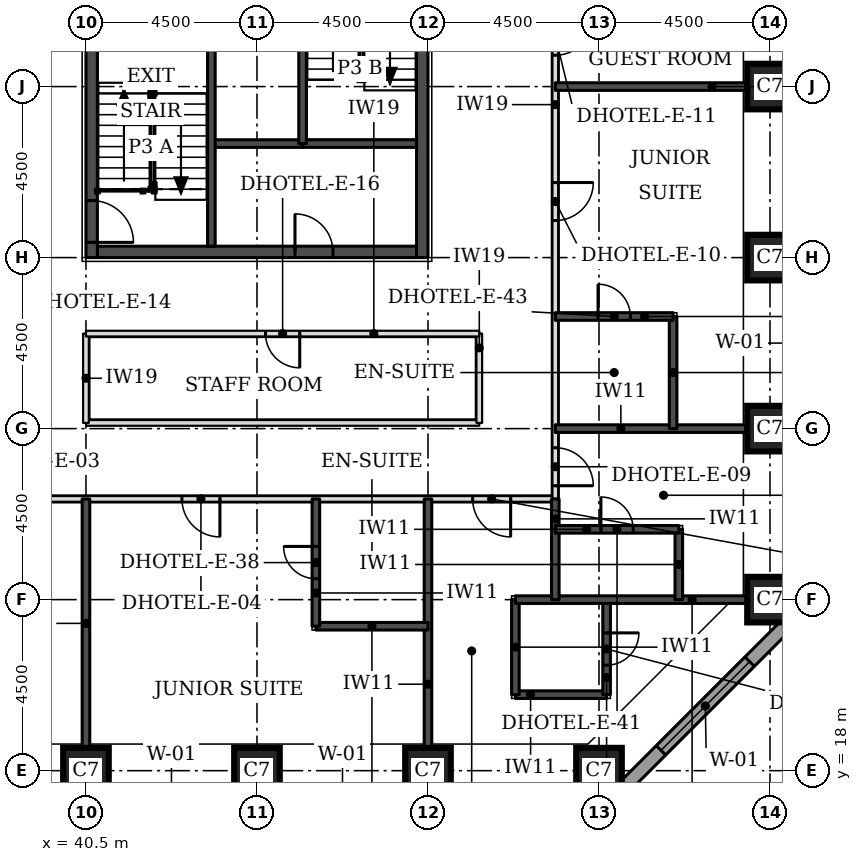
"""IFC4 building model, lengths in metres.
Left out: names, types, materials, properties, quantities, classifications, styles, units other than length and angle.
Written with IfcOpenShell. Run it as: python <this file> out.ifc"""

import sys

from ifc_helpers import new_model, si_unit, direction, frame, frame_2d, origin, origin_2d, place, context, subcontext, project, spatial, rectangle, extrude, element, fill, save


model = new_model("IFC4")
c1 = context("Model", 3, precision=1e-05, world=origin(), true_north=direction((0.0, 1.0)))
c2 = subcontext(c1, "Body", "Model", "MODEL_VIEW")
j1 = project(units=[si_unit("LENGTHUNIT", "METRE"), si_unit("PLANEANGLEUNIT", "RADIAN")], contexts=[c1])
p1 = place(None, origin())
s1 = spatial("IfcSite", under=j1, at=p1, CompositionType="ELEMENT")
p2 = place(p1, origin())
s2 = spatial("IfcBuilding", under=s1, at=p2, CompositionType="ELEMENT")
p3 = place(p2, frame((0.0, 0.0, 62.7)))
s3 = spatial("IfcBuildingStorey", under=s2, at=p3, CompositionType="ELEMENT", Elevation=62.7)
for number, where, z_axis, x_axis in (
    (1, (40.5, 18.0, 0.0), (0.0, 0.0, 1.0), (1.0, 0.0, 0.0)),
    (2, (45.0, 18.0, 0.0), (0.0, 0.0, 1.0), (1.0, 0.0, 0.0)),
    (3, (49.5, 18.0, 0.0), (0.0, 0.0, 1.0), (1.0, 0.0, 0.0)),
    (4, (54.0, 18.0, 0.0), (0.0, 0.0, 1.0), (1.0, 0.0, 0.0)),
    (5, (58.5, 22.5, 0.0), (0.0, 0.0, 1.0), (1.0, 0.0, 0.0)),
    (6, (58.5, 27.0, 0.0), (0.0, 0.0, 1.0), (1.0, 0.0, 0.0)),
    (7, (58.5, 31.5, 0.0), (0.0, 0.0, 1.0), (1.0, 0.0, 0.0)),
    (8, (58.5, 36.0, 0.0), (0.0, 0.0, 1.0), (1.0, 0.0, 0.0)),
):
    element("IfcColumn", number, at=place(p3, frame(where, z_axis=z_axis, x_axis=x_axis)), inside=s3, PredefinedType="COLUMN", context=c2, shape_type="SweptSolid", body=[
        extrude(rectangle(XDim=1.2, YDim=1.2, at=origin_2d()), origin(), (0.0, 0.0, 1.0), 3.3),
    ])
p4 = place(p3, frame((40.8, 31.65, 0.0), z_axis=(0.0, 0.0, 1.0), x_axis=(1.0, 0.0, 0.0)))
e9 = element("IfcWall", 9, at=p4, inside=s3, PredefinedType="SHEAR", context=c2, shape_type="SweptSolid", body=[
    extrude(rectangle(XDim=8.4, YDim=0.3, at=frame_2d((4.2, 0.0))), origin(), (0.0, 0.0, 1.0), 3.3),
])
p5 = place(p4, frame((5.2, 0.0, 0.0)))
e10 = element("IfcOpeningElement", 10, at=p5, cuts=e9, PredefinedType="OPENING", context=c2, shape_type="SweptSolid", body=[
    extrude(rectangle(XDim=1.0, YDim=2.1, at=frame_2d((0.5, 1.05))), frame((0.0, 0.16, 0.0), z_axis=(0.0, -1.0, 0.0), x_axis=(1.0, 0.0, 0.0)), (0.0, 0.0, 1.0), 0.32),
])
p6 = place(p3, frame((40.65, 31.5, 0.0), z_axis=(0.0, 0.0, 1.0), x_axis=(0.0, 1.0, 0.0)))
e11 = element("IfcWall", 11, at=p6, inside=s3, PredefinedType="SHEAR", context=c2, shape_type="SweptSolid", body=[
    extrude(rectangle(XDim=9.0, YDim=0.3, at=frame_2d((4.5, 0.0))), origin(), (0.0, 0.0, 1.0), 3.3),
])
p7 = place(p6, frame((0.4, 0.0, 0.0)))
e12 = element("IfcOpeningElement", 12, at=p7, cuts=e11, PredefinedType="OPENING", context=c2, shape_type="SweptSolid", body=[
    extrude(rectangle(XDim=1.1, YDim=2.1, at=frame_2d((0.55, 1.05))), frame((0.0, 0.16, 0.0), z_axis=(0.0, -1.0, 0.0), x_axis=(1.0, 0.0, 0.0)), (0.0, 0.0, 1.0), 0.32),
])
p8 = place(p3, frame((49.35, 31.5, 0.0), z_axis=(0.0, 0.0, 1.0), x_axis=(0.0, 1.0, 0.0)))
e13 = element("IfcWall", 13, at=p8, inside=s3, PredefinedType="SHEAR", context=c2, shape_type="SweptSolid", body=[
    extrude(rectangle(XDim=9.0, YDim=0.3, at=frame_2d((4.5, 0.0))), origin(), (0.0, 0.0, 1.0), 3.3),
])
p9 = place(p3, frame((54.27, 17.174, 0.0), z_axis=(0.0, 0.0, 1.0), x_axis=(0.707106781187, 0.707106781187, 0.0)))
e14 = element("IfcWall", 14, at=p9, inside=s3, PredefinedType="STANDARD", context=c2, shape_type="SweptSolid", body=[
    extrude(rectangle(XDim=7.151, YDim=0.35, at=frame_2d((3.576, 0.0))), origin(), (0.0, 0.0, 1.0), 3.055),
])
p10 = place(p9, frame((1.926, 0.0, 0.8)))
e15 = element("IfcOpeningElement", 15, at=p10, cuts=e14, PredefinedType="OPENING", context=c2, shape_type="SweptSolid", body=[
    extrude(rectangle(XDim=3.3, YDim=1.5, at=frame_2d((1.65, 0.75))), frame((0.0, 0.185, 0.0), z_axis=(0.0, -1.0, 0.0), x_axis=(1.0, 0.0, 0.0)), (0.0, 0.0, 1.0), 0.37),
])
p11 = place(p3, frame((20.65, 25.15, 0.0), z_axis=(0.0, 0.0, 1.0), x_axis=(1.0, 0.0, 0.0)))
e16 = element("IfcWall", 16, at=p11, inside=s3, PredefinedType="PARTITIONING", context=c2, shape_type="SweptSolid", body=[
    extrude(rectangle(XDim=32.2, YDim=0.15, at=frame_2d((16.1, 0.0))), origin(), (0.0, 0.0, 1.0), 3.08),
])
p12 = place(p11, frame((4.375, 0.0, 0.0)))
e17 = element("IfcOpeningElement", 17, at=p12, cuts=e16, PredefinedType="OPENING", context=c2, shape_type="SweptSolid", body=[
    extrude(rectangle(XDim=1.0, YDim=2.1, at=frame_2d((0.5, 1.05))), frame((0.0, 0.085, 0.0), z_axis=(0.0, -1.0, 0.0), x_axis=(1.0, 0.0, 0.0)), (0.0, 0.0, 1.0), 0.17),
])
p13 = place(p11, frame((16.075, 0.0, 0.0)))
e18 = element("IfcOpeningElement", 18, at=p13, cuts=e16, PredefinedType="OPENING", context=c2, shape_type="SweptSolid", body=[
    extrude(rectangle(XDim=1.0, YDim=2.1, at=frame_2d((0.5, 1.05))), frame((0.0, 0.085, 0.0), z_axis=(0.0, -1.0, 0.0), x_axis=(1.0, 0.0, 0.0)), (0.0, 0.0, 1.0), 0.17),
])
p14 = place(p11, frame((22.375, 0.0, 0.0)))
e19 = element("IfcOpeningElement", 19, at=p14, cuts=e16, PredefinedType="OPENING", context=c2, shape_type="SweptSolid", body=[
    extrude(rectangle(XDim=1.0, YDim=2.1, at=frame_2d((0.5, 1.05))), frame((0.0, 0.085, 0.0), z_axis=(0.0, -1.0, 0.0), x_axis=(1.0, 0.0, 0.0)), (0.0, 0.0, 1.0), 0.17),
])
p15 = place(p11, frame((0.425, 0.0, 0.0)))
e20 = element("IfcOpeningElement", 20, at=p15, cuts=e16, PredefinedType="OPENING", context=c2, shape_type="SweptSolid", body=[
    extrude(rectangle(XDim=1.0, YDim=2.1, at=frame_2d((0.5, 1.05))), frame((0.0, 0.085, 0.0), z_axis=(0.0, -1.0, 0.0), x_axis=(1.0, 0.0, 0.0)), (0.0, 0.0, 1.0), 0.17),
])
p16 = place(p11, frame((30.025, 0.0, 0.0)))
e21 = element("IfcOpeningElement", 21, at=p16, cuts=e16, PredefinedType="OPENING", context=c2, shape_type="SweptSolid", body=[
    extrude(rectangle(XDim=1.0, YDim=2.1, at=frame_2d((0.5, 1.05))), frame((0.0, 0.085, 0.0), z_axis=(0.0, -1.0, 0.0), x_axis=(1.0, 0.0, 0.0)), (0.0, 0.0, 1.0), 0.17),
])
p17 = place(p3, frame((52.85, 25.15, 0.0), z_axis=(0.0, 0.0, 1.0), x_axis=(0.0, 1.0, 0.0)))
e22 = element("IfcWall", 22, at=p17, inside=s3, PredefinedType="PARTITIONING", context=c2, shape_type="SweptSolid", body=[
    extrude(rectangle(XDim=22.35, YDim=0.15, at=frame_2d((11.175, 0.0))), origin(), (0.0, 0.0, 1.0), 3.08),
])
p18 = place(p17, frame((0.347, 0.0, 0.0)))
e23 = element("IfcOpeningElement", 23, at=p18, cuts=e22, PredefinedType="OPENING", context=c2, shape_type="SweptSolid", body=[
    extrude(rectangle(XDim=1.0, YDim=2.1, at=frame_2d((0.5, 1.05))), frame((0.0, 0.085, 0.0), z_axis=(0.0, -1.0, 0.0), x_axis=(1.0, 0.0, 0.0)), (0.0, 0.0, 1.0), 0.17),
])
p19 = place(p17, frame((7.325, 0.0, 0.0)))
e24 = element("IfcOpeningElement", 24, at=p19, cuts=e22, PredefinedType="OPENING", context=c2, shape_type="SweptSolid", body=[
    extrude(rectangle(XDim=1.0, YDim=2.1, at=frame_2d((0.5, 1.05))), frame((0.0, 0.085, 0.0), z_axis=(0.0, -1.0, 0.0), x_axis=(1.0, 0.0, 0.0)), (0.0, 0.0, 1.0), 0.17),
])
p20 = place(p17, frame((11.675, 0.0, 0.0)))
e25 = element("IfcOpeningElement", 25, at=p20, cuts=e22, PredefinedType="OPENING", context=c2, shape_type="SweptSolid", body=[
    extrude(rectangle(XDim=1.0, YDim=2.1, at=frame_2d((0.5, 1.05))), frame((0.0, 0.085, 0.0), z_axis=(0.0, -1.0, 0.0), x_axis=(1.0, 0.0, 0.0)), (0.0, 0.0, 1.0), 0.17),
])
p21 = place(p17, frame((18.4, 0.0, 0.0)))
e26 = element("IfcOpeningElement", 26, at=p21, cuts=e22, PredefinedType="OPENING", context=c2, shape_type="SweptSolid", body=[
    extrude(rectangle(XDim=0.9, YDim=2.1, at=frame_2d((0.45, 1.05))), frame((0.0, 0.085, 0.0), z_axis=(0.0, -1.0, 0.0), x_axis=(1.0, 0.0, 0.0)), (0.0, 0.0, 1.0), 0.17),
])
p22 = place(p3, frame((40.5, 27.15, 0.0), z_axis=(0.0, 0.0, 1.0), x_axis=(1.0, 0.0, 0.0)))
e27 = element("IfcWall", 27, at=p22, inside=s3, PredefinedType="PARTITIONING", context=c2, shape_type="SweptSolid", body=[
    extrude(rectangle(XDim=10.35, YDim=0.15, at=frame_2d((5.175, 0.0))), origin(), (0.0, 0.0, 1.0), 3.08),
])
for number, where, z_axis, x_axis in (
    (28, (40.5, 27.15, 0.0), (0.0, 0.0, 1.0), (0.0, 1.0, 0.0)),
    (29, (50.85, 27.15, 0.0), (0.0, 0.0, 1.0), (0.0, 1.0, 0.0)),
):
    element("IfcWall", number, at=place(p3, frame(where, z_axis=z_axis, x_axis=x_axis)), inside=s3, PredefinedType="PARTITIONING", context=c2, shape_type="SweptSolid", body=[
        extrude(rectangle(XDim=2.35, YDim=0.15, at=frame_2d((1.175, 0.0))), origin(), (0.0, 0.0, 1.0), 3.08),
    ])
p23 = place(p3, frame((40.5, 29.5, 0.0), z_axis=(0.0, 0.0, 1.0), x_axis=(1.0, 0.0, 0.0)))
e30 = element("IfcWall", 30, at=p23, inside=s3, PredefinedType="PARTITIONING", context=c2, shape_type="SweptSolid", body=[
    extrude(rectangle(XDim=10.35, YDim=0.15, at=frame_2d((5.175, 0.0))), origin(), (0.0, 0.0, 1.0), 3.08),
])
p24 = place(p23, frame((4.725, 0.0, 0.0)))
e31 = element("IfcOpeningElement", 31, at=p24, cuts=e30, PredefinedType="OPENING", context=c2, shape_type="SweptSolid", body=[
    extrude(rectangle(XDim=0.9, YDim=2.1, at=frame_2d((0.45, 1.05))), frame((0.0, 0.085, 0.0), z_axis=(0.0, -1.0, 0.0), x_axis=(1.0, 0.0, 0.0)), (0.0, 0.0, 1.0), 0.17),
])
for number, where, z_axis, x_axis in (
    (32, (40.5, 18.6, 0.0), (0.0, 0.0, 1.0), (0.0, 1.0, 0.0)),
    (33, (49.5, 18.6, 0.0), (0.0, 0.0, 1.0), (0.0, 1.0, 0.0)),
):
    element("IfcWall", number, at=place(p3, frame(where, z_axis=z_axis, x_axis=x_axis)), inside=s3, PredefinedType="SOLIDWALL", context=c2, shape_type="SweptSolid", body=[
        extrude(rectangle(XDim=6.55, YDim=0.2, at=frame_2d((3.275, 0.0))), origin(), (0.0, 0.0, 1.0), 3.08),
    ])
p25 = place(p3, frame((51.8, 20.0, 0.0), z_axis=(0.0, 0.0, 1.0), x_axis=(1.0, 0.0, 0.0)))
e34 = element("IfcWall", 34, at=p25, inside=s3, PredefinedType="SOLIDWALL", context=c2, shape_type="SweptSolid", body=[
    extrude(rectangle(XDim=2.4, YDim=0.2, at=frame_2d((1.2, 0.0))), origin(), (0.0, 0.0, 1.0), 3.08),
])
p26 = place(p3, frame((51.8, 20.0, 0.0), z_axis=(0.0, 0.0, 1.0), x_axis=(0.0, 1.0, 0.0)))
e35 = element("IfcWall", 35, at=p26, inside=s3, PredefinedType="SOLIDWALL", context=c2, shape_type="SweptSolid", body=[
    extrude(rectangle(XDim=2.5, YDim=0.2, at=frame_2d((1.25, 0.0))), origin(), (0.0, 0.0, 1.0), 3.08),
])
p27 = place(p3, frame((54.2, 20.0, 0.0), z_axis=(0.0, 0.0, 1.0), x_axis=(0.0, 1.0, 0.0)))
e36 = element("IfcWall", 36, at=p27, inside=s3, PredefinedType="SOLIDWALL", context=c2, shape_type="SweptSolid", body=[
    extrude(rectangle(XDim=2.5, YDim=0.2, at=frame_2d((1.25, 0.0))), origin(), (0.0, 0.0, 1.0), 3.08),
])
p28 = place(p27, frame((0.775, 0.0, 0.0)))
e37 = element("IfcOpeningElement", 37, at=p28, cuts=e36, PredefinedType="OPENING", context=c2, shape_type="SweptSolid", body=[
    extrude(rectangle(XDim=0.85, YDim=2.1, at=frame_2d((0.425, 1.05))), frame((0.0, 0.11, 0.0), z_axis=(0.0, -1.0, 0.0), x_axis=(1.0, 0.0, 0.0)), (0.0, 0.0, 1.0), 0.22),
])
p29 = place(p3, frame((46.55, 21.8, 0.0), z_axis=(0.0, 0.0, 1.0), x_axis=(1.0, 0.0, 0.0)))
e38 = element("IfcWall", 38, at=p29, inside=s3, PredefinedType="SOLIDWALL", context=c2, shape_type="SweptSolid", body=[
    extrude(rectangle(XDim=2.95, YDim=0.2, at=frame_2d((1.475, 0.0))), origin(), (0.0, 0.0, 1.0), 3.08),
])
p30 = place(p3, frame((46.55, 21.8, 0.0), z_axis=(0.0, 0.0, 1.0), x_axis=(0.0, 1.0, 0.0)))
e39 = element("IfcWall", 39, at=p30, inside=s3, PredefinedType="SOLIDWALL", context=c2, shape_type="SweptSolid", body=[
    extrude(rectangle(XDim=3.35, YDim=0.2, at=frame_2d((1.675, 0.0))), origin(), (0.0, 0.0, 1.0), 3.08),
])
p31 = place(p30, frame((1.25, 0.0, 0.0)))
e40 = element("IfcOpeningElement", 40, at=p31, cuts=e39, PredefinedType="OPENING", context=c2, shape_type="SweptSolid", body=[
    extrude(rectangle(XDim=0.85, YDim=2.1, at=frame_2d((0.425, 1.05))), frame((0.0, 0.11, 0.0), z_axis=(0.0, -1.0, 0.0), x_axis=(1.0, 0.0, 0.0)), (0.0, 0.0, 1.0), 0.22),
])
p32 = place(p3, frame((51.8, 22.5, 0.0), z_axis=(0.0, 0.0, 1.0), x_axis=(1.0, 0.0, 0.0)))
e41 = element("IfcWall", 41, at=p32, inside=s3, PredefinedType="SOLIDWALL", context=c2, shape_type="SweptSolid", body=[
    extrude(rectangle(XDim=6.1, YDim=0.2, at=frame_2d((3.05, 0.0))), origin(), (0.0, 0.0, 1.0), 3.08),
])
p33 = place(p3, frame((52.85, 22.5, 0.0), z_axis=(0.0, 0.0, 1.0), x_axis=(0.0, 1.0, 0.0)))
e42 = element("IfcWall", 42, at=p33, inside=s3, PredefinedType="SOLIDWALL", context=c2, shape_type="SweptSolid", body=[
    extrude(rectangle(XDim=2.65, YDim=0.2, at=frame_2d((1.325, 0.0))), origin(), (0.0, 0.0, 1.0), 3.08),
])
p34 = place(p3, frame((56.1, 22.5, 0.0), z_axis=(0.0, 0.0, 1.0), x_axis=(0.0, 1.0, 0.0)))
e43 = element("IfcWall", 43, at=p34, inside=s3, PredefinedType="SOLIDWALL", context=c2, shape_type="SweptSolid", body=[
    extrude(rectangle(XDim=1.85, YDim=0.2, at=frame_2d((0.925, 0.0))), origin(), (0.0, 0.0, 1.0), 3.08),
])
p35 = place(p3, frame((52.85, 24.35, 0.0), z_axis=(0.0, 0.0, 1.0), x_axis=(1.0, 0.0, 0.0)))
e44 = element("IfcWall", 44, at=p35, inside=s3, PredefinedType="SOLIDWALL", context=c2, shape_type="SweptSolid", body=[
    extrude(rectangle(XDim=3.25, YDim=0.2, at=frame_2d((1.625, 0.0))), origin(), (0.0, 0.0, 1.0), 3.08),
])
p36 = place(p35, frame((1.2, 0.0, 0.0)))
e45 = element("IfcOpeningElement", 45, at=p36, cuts=e44, PredefinedType="OPENING", context=c2, shape_type="SweptSolid", body=[
    extrude(rectangle(XDim=0.85, YDim=2.1, at=frame_2d((0.425, 1.05))), frame((0.0, 0.11, 0.0), z_axis=(0.0, -1.0, 0.0), x_axis=(1.0, 0.0, 0.0)), (0.0, 0.0, 1.0), 0.22),
])
p37 = place(p3, frame((52.85, 27.0, 0.0), z_axis=(0.0, 0.0, 1.0), x_axis=(1.0, 0.0, 0.0)))
e46 = element("IfcWall", 46, at=p37, inside=s3, PredefinedType="SOLIDWALL", context=c2, shape_type="SweptSolid", body=[
    extrude(rectangle(XDim=5.05, YDim=0.2, at=frame_2d((2.525, 0.0))), origin(), (0.0, 0.0, 1.0), 3.08),
])
p38 = place(p3, frame((55.95, 27.0, 0.0), z_axis=(0.0, 0.0, 1.0), x_axis=(0.0, 1.0, 0.0)))
e47 = element("IfcWall", 47, at=p38, inside=s3, PredefinedType="SOLIDWALL", context=c2, shape_type="SweptSolid", body=[
    extrude(rectangle(XDim=2.95, YDim=0.2, at=frame_2d((1.475, 0.0))), origin(), (0.0, 0.0, 1.0), 3.08),
])
p39 = place(p3, frame((52.85, 29.95, 0.0), z_axis=(0.0, 0.0, 1.0), x_axis=(1.0, 0.0, 0.0)))
e48 = element("IfcWall", 48, at=p39, inside=s3, PredefinedType="SOLIDWALL", context=c2, shape_type="SweptSolid", body=[
    extrude(rectangle(XDim=3.1, YDim=0.2, at=frame_2d((1.55, 0.0))), origin(), (0.0, 0.0, 1.0), 3.08),
])
p40 = place(p39, frame((1.125, 0.0, 0.0)))
e49 = element("IfcOpeningElement", 49, at=p40, cuts=e48, PredefinedType="OPENING", context=c2, shape_type="SweptSolid", body=[
    extrude(rectangle(XDim=0.85, YDim=2.1, at=frame_2d((0.425, 1.05))), frame((0.0, 0.11, 0.0), z_axis=(0.0, -1.0, 0.0), x_axis=(1.0, 0.0, 0.0)), (0.0, 0.0, 1.0), 0.22),
])
p41 = place(p3, frame((52.85, 36.0, 0.0), z_axis=(0.0, 0.0, 1.0), x_axis=(1.0, 0.0, 0.0)))
e50 = element("IfcWall", 50, at=p41, inside=s3, PredefinedType="SOLIDWALL", context=c2, shape_type="SweptSolid", body=[
    extrude(rectangle(XDim=5.05, YDim=0.2, at=frame_2d((2.525, 0.0))), origin(), (0.0, 0.0, 1.0), 3.08),
])
p42 = place(p3, frame((43.8, 34.5, 0.0), z_axis=(0.0, 0.0, 1.0), x_axis=(1.0, 0.0, 0.0)))
e51 = element("IfcWall", 51, at=p42, inside=s3, PredefinedType="SOLIDWALL", context=c2, shape_type="SweptSolid", body=[
    extrude(rectangle(XDim=2.4, YDim=0.2, at=frame_2d((1.2, 0.0))), origin(), (0.0, 0.0, 1.0), 3.08),
])
p43 = place(p3, frame((46.2, 34.5, 0.0), z_axis=(0.0, 0.0, 1.0), x_axis=(1.0, 0.0, 0.0)))
e52 = element("IfcWall", 52, at=p43, inside=s3, PredefinedType="SOLIDWALL", context=c2, shape_type="SweptSolid", body=[
    extrude(rectangle(XDim=3.0, YDim=0.2, at=frame_2d((1.5, 0.0))), origin(), (0.0, 0.0, 1.0), 3.08),
])
for number, where, z_axis, x_axis in (
    (53, (43.8, 31.8, 0.0), (0.0, 0.0, 1.0), (0.0, 1.0, 0.0)),
    (54, (46.2, 34.5, 0.0), (0.0, 0.0, 1.0), (0.0, 1.0, 0.0)),
):
    element("IfcWall", number, at=place(p3, frame(where, z_axis=z_axis, x_axis=x_axis)), inside=s3, PredefinedType="SOLIDWALL", context=c2, shape_type="SweptSolid", body=[
        extrude(rectangle(XDim=5.7, YDim=0.2, at=frame_2d((2.85, 0.0))), origin(), (0.0, 0.0, 1.0), 3.08),
    ])
p44 = place(p10, origin())
e55 = element("IfcWindow", 55, at=p44, inside=s3, PartitioningType="SINGLE_PANEL", PredefinedType="WINDOW", context=c2, shape_type="SweptSolid", body=[
    extrude(rectangle(XDim=3.3, YDim=1.5, at=frame_2d((1.65, 0.75))), frame((0.0, 0.085, 0.0), z_axis=(0.0, -1.0, 0.0), x_axis=(1.0, 0.0, 0.0)), (0.0, 0.0, 1.0), 0.06),
])
fill(e15, e55)
p45 = place(p14, frame((1.0, 0.0, 0.0), z_axis=(0.0, 0.0, 1.0), x_axis=(-1.0, 0.0, 0.0)))
e56 = element("IfcDoor", 56, at=p45, inside=s3, OperationType="SINGLE_SWING_LEFT", PredefinedType="DOOR", context=c2, shape_type="SweptSolid", body=[
    extrude(rectangle(XDim=1.0, YDim=2.1, at=frame_2d((0.5, 1.05))), frame((0.0, 0.025, 0.0), z_axis=(0.0, -1.0, 0.0), x_axis=(1.0, 0.0, 0.0)), (0.0, 0.0, 1.0), 0.05),
])
fill(e19, e56)
p46 = place(p31, origin())
e57 = element("IfcDoor", 57, at=p46, inside=s3, OperationType="SINGLE_SWING_RIGHT", PredefinedType="DOOR", context=c2, shape_type="SweptSolid", body=[
    extrude(rectangle(XDim=0.85, YDim=2.1, at=frame_2d((0.425, 1.05))), frame((0.0, 0.025, 0.0), z_axis=(0.0, -1.0, 0.0), x_axis=(1.0, 0.0, 0.0)), (0.0, 0.0, 1.0), 0.05),
])
fill(e40, e57)
p47 = place(p18, frame((1.0, 0.0, 0.0), z_axis=(0.0, 0.0, 1.0), x_axis=(-1.0, 0.0, 0.0)))
e58 = element("IfcDoor", 58, at=p47, inside=s3, OperationType="SINGLE_SWING_RIGHT", PredefinedType="DOOR", context=c2, shape_type="SweptSolid", body=[
    extrude(rectangle(XDim=1.0, YDim=2.1, at=frame_2d((0.5, 1.05))), frame((0.0, 0.025, 0.0), z_axis=(0.0, -1.0, 0.0), x_axis=(1.0, 0.0, 0.0)), (0.0, 0.0, 1.0), 0.05),
])
fill(e23, e58)
p48 = place(p36, origin())
e59 = element("IfcDoor", 59, at=p48, inside=s3, OperationType="SINGLE_SWING_LEFT", PredefinedType="DOOR", context=c2, shape_type="SweptSolid", body=[
    extrude(rectangle(XDim=0.85, YDim=2.1, at=frame_2d((0.425, 1.05))), frame((0.0, 0.025, 0.0), z_axis=(0.0, -1.0, 0.0), x_axis=(1.0, 0.0, 0.0)), (0.0, 0.0, 1.0), 0.05),
])
fill(e45, e59)
p49 = place(p19, frame((1.0, 0.0, 0.0), z_axis=(0.0, 0.0, 1.0), x_axis=(-1.0, 0.0, 0.0)))
e60 = element("IfcDoor", 60, at=p49, inside=s3, OperationType="SINGLE_SWING_LEFT", PredefinedType="DOOR", context=c2, shape_type="SweptSolid", body=[
    extrude(rectangle(XDim=1.0, YDim=2.1, at=frame_2d((0.5, 1.05))), frame((0.0, 0.025, 0.0), z_axis=(0.0, -1.0, 0.0), x_axis=(1.0, 0.0, 0.0)), (0.0, 0.0, 1.0), 0.05),
])
fill(e24, e60)
p50 = place(p40, origin())
e61 = element("IfcDoor", 61, at=p50, inside=s3, OperationType="SINGLE_SWING_LEFT", PredefinedType="DOOR", context=c2, shape_type="SweptSolid", body=[
    extrude(rectangle(XDim=0.85, YDim=2.1, at=frame_2d((0.425, 1.05))), frame((0.0, 0.025, 0.0), z_axis=(0.0, -1.0, 0.0), x_axis=(1.0, 0.0, 0.0)), (0.0, 0.0, 1.0), 0.05),
])
fill(e49, e61)
p51 = place(p20, frame((1.0, 0.0, 0.0), z_axis=(0.0, 0.0, 1.0), x_axis=(-1.0, 0.0, 0.0)))
e62 = element("IfcDoor", 62, at=p51, inside=s3, OperationType="SINGLE_SWING_LEFT", PredefinedType="DOOR", context=c2, shape_type="SweptSolid", body=[
    extrude(rectangle(XDim=1.0, YDim=2.1, at=frame_2d((0.5, 1.05))), frame((0.0, 0.025, 0.0), z_axis=(0.0, -1.0, 0.0), x_axis=(1.0, 0.0, 0.0)), (0.0, 0.0, 1.0), 0.05),
])
fill(e25, e62)
p52 = place(p16, frame((1.0, 0.0, 0.0), z_axis=(0.0, 0.0, 1.0), x_axis=(-1.0, 0.0, 0.0)))
e63 = element("IfcDoor", 63, at=p52, inside=s3, OperationType="SINGLE_SWING_LEFT", PredefinedType="DOOR", context=c2, shape_type="SweptSolid", body=[
    extrude(rectangle(XDim=1.0, YDim=2.1, at=frame_2d((0.5, 1.05))), frame((0.0, 0.025, 0.0), z_axis=(0.0, -1.0, 0.0), x_axis=(1.0, 0.0, 0.0)), (0.0, 0.0, 1.0), 0.05),
])
fill(e21, e63)
p53 = place(p28, frame((0.85, 0.0, 0.0), z_axis=(0.0, 0.0, 1.0), x_axis=(-1.0, 0.0, 0.0)))
e64 = element("IfcDoor", 64, at=p53, inside=s3, OperationType="SINGLE_SWING_LEFT", PredefinedType="DOOR", context=c2, shape_type="SweptSolid", body=[
    extrude(rectangle(XDim=0.85, YDim=2.1, at=frame_2d((0.425, 1.05))), frame((0.0, 0.025, 0.0), z_axis=(0.0, -1.0, 0.0), x_axis=(1.0, 0.0, 0.0)), (0.0, 0.0, 1.0), 0.05),
])
fill(e37, e64)
p54 = place(p24, frame((0.9, 0.0, 0.0), z_axis=(0.0, 0.0, 1.0), x_axis=(-1.0, 0.0, 0.0)))
e65 = element("IfcDoor", 65, at=p54, inside=s3, OperationType="SINGLE_SWING_LEFT", PredefinedType="DOOR", context=c2, shape_type="SweptSolid", body=[
    extrude(rectangle(XDim=0.9, YDim=2.1, at=frame_2d((0.45, 1.05))), frame((0.0, 0.025, 0.0), z_axis=(0.0, -1.0, 0.0), x_axis=(1.0, 0.0, 0.0)), (0.0, 0.0, 1.0), 0.05),
])
fill(e31, e65)
p55 = place(p7, frame((1.1, 0.0, 0.0), z_axis=(0.0, 0.0, 1.0), x_axis=(-1.0, 0.0, 0.0)))
e66 = element("IfcDoor", 66, at=p55, inside=s3, OperationType="SINGLE_SWING_RIGHT", PredefinedType="DOOR", context=c2, shape_type="SweptSolid", body=[
    extrude(rectangle(XDim=1.1, YDim=2.1, at=frame_2d((0.55, 1.05))), frame((0.0, 0.025, 0.0), z_axis=(0.0, -1.0, 0.0), x_axis=(1.0, 0.0, 0.0)), (0.0, 0.0, 1.0), 0.05),
])
fill(e12, e66)
p56 = place(p5, origin())
e67 = element("IfcDoor", 67, at=p56, inside=s3, OperationType="SINGLE_SWING_LEFT", PredefinedType="DOOR", context=c2, shape_type="SweptSolid", body=[
    extrude(rectangle(XDim=1.0, YDim=2.1, at=frame_2d((0.5, 1.05))), frame((0.0, 0.025, 0.0), z_axis=(0.0, -1.0, 0.0), x_axis=(1.0, 0.0, 0.0)), (0.0, 0.0, 1.0), 0.05),
])
fill(e10, e67)
save(model, sys.argv[1])
